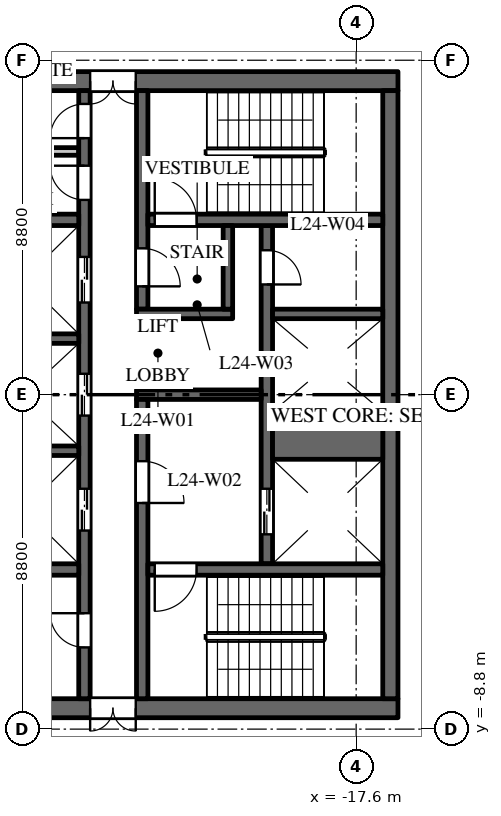
"""IFC4 building model, lengths in metres.
Left out: names, types, materials, properties, quantities, classifications, styles, units other than length and angle.
Written with IfcOpenShell. Run it as: python <this file> out.ifc"""

import sys

from ifc_helpers import new_model, si_unit, direction, frame, frame_2d, origin, place, context, subcontext, project, spatial, rectangle, extrude, element, fill, save


model = new_model("IFC4")
c1 = context("Model", 3, precision=1e-05, world=origin(), true_north=direction((0.0, 1.0)))
c2 = subcontext(c1, "Body", "Model", "MODEL_VIEW")
j1 = project(units=[si_unit("LENGTHUNIT", "METRE"), si_unit("PLANEANGLEUNIT", "RADIAN")], contexts=[c1])
p1 = place(None, origin())
s1 = spatial("IfcSite", under=j1, at=p1, CompositionType="ELEMENT")
p2 = place(p1, origin())
s2 = spatial("IfcBuilding", under=s1, at=p2, CompositionType="ELEMENT")
p3 = place(p2, frame((0.0, 0.0, 108.0)))
s3 = spatial("IfcBuildingStorey", under=s2, at=p3, CompositionType="ELEMENT", Elevation=108.0)
p4 = place(p3, frame((-16.5, 8.25, 0.0), z_axis=(0.0, 0.0, 1.0), x_axis=(-1.0, 0.0, 0.0)))
e1 = element("IfcWall", 1, at=p4, inside=s3, PredefinedType="SHEAR", context=c2, shape_type="SweptSolid", body=[
    extrude(rectangle(XDim=15.0, YDim=0.5, at=frame_2d((7.5, 0.0))), origin(), (0.0, 0.0, 1.0), 3.7),
])
p5 = place(p4, frame((6.9, 0.0, 0.0)))
e2 = element("IfcOpeningElement", 2, at=p5, cuts=e1, PredefinedType="OPENING", context=c2, shape_type="SweptSolid", body=[
    extrude(rectangle(XDim=1.2, YDim=2.1, at=frame_2d((0.6, 1.05))), frame((0.0, 0.26, 0.0), z_axis=(0.0, -1.0, 0.0), x_axis=(1.0, 0.0, 0.0)), (0.0, 0.0, 1.0), 0.52),
])
p6 = place(p4, frame((12.275, 0.0, 0.0)))
e3 = element("IfcOpeningElement", 3, at=p6, cuts=e1, PredefinedType="OPENING", context=c2, shape_type="SweptSolid", body=[
    extrude(rectangle(XDim=0.9, YDim=2.1, at=frame_2d((0.45, 1.05))), frame((0.0, 0.26, 0.0), z_axis=(0.0, -1.0, 0.0), x_axis=(1.0, 0.0, 0.0)), (0.0, 0.0, 1.0), 0.52),
])
p7 = place(p3, frame((-16.5, -8.25, 0.0), z_axis=(0.0, 0.0, 1.0), x_axis=(-1.0, 0.0, 0.0)))
e4 = element("IfcWall", 4, at=p7, inside=s3, PredefinedType="SHEAR", context=c2, shape_type="SweptSolid", body=[
    extrude(rectangle(XDim=15.0, YDim=0.5, at=frame_2d((7.5, 0.0))), origin(), (0.0, 0.0, 1.0), 3.7),
])
p8 = place(p7, frame((6.9, 0.0, 0.0)))
e5 = element("IfcOpeningElement", 5, at=p8, cuts=e4, PredefinedType="OPENING", context=c2, shape_type="SweptSolid", body=[
    extrude(rectangle(XDim=1.2, YDim=2.1, at=frame_2d((0.6, 1.05))), frame((0.0, 0.26, 0.0), z_axis=(0.0, -1.0, 0.0), x_axis=(1.0, 0.0, 0.0)), (0.0, 0.0, 1.0), 0.52),
])
p9 = place(p7, frame((12.425, 0.0, 0.0)))
e6 = element("IfcOpeningElement", 6, at=p9, cuts=e4, PredefinedType="OPENING", context=c2, shape_type="SweptSolid", body=[
    extrude(rectangle(XDim=0.9, YDim=2.1, at=frame_2d((0.45, 1.05))), frame((0.0, 0.26, 0.0), z_axis=(0.0, -1.0, 0.0), x_axis=(1.0, 0.0, 0.0)), (0.0, 0.0, 1.0), 0.52),
])
p10 = place(p3, frame((-19.95, -4.45, 0.0), z_axis=(0.0, 0.0, 1.0), x_axis=(0.0, 1.0, 0.0)))
e7 = element("IfcWall", 7, at=p10, inside=s3, PredefinedType="SHEAR", context=c2, shape_type="SweptSolid", body=[
    extrude(rectangle(XDim=8.9, YDim=0.3, at=frame_2d((4.45, 0.0))), origin(), (0.0, 0.0, 1.0), 3.7),
])
p11 = place(p10, frame((0.775, 0.0, 0.0)))
e8 = element("IfcOpeningElement", 8, at=p11, cuts=e7, PredefinedType="OPENING", context=c2, shape_type="SweptSolid", body=[
    extrude(rectangle(XDim=1.2, YDim=2.1, at=frame_2d((0.6, 1.05))), frame((0.0, 0.16, 0.0), z_axis=(0.0, -1.0, 0.0), x_axis=(1.0, 0.0, 0.0)), (0.0, 0.0, 1.0), 0.32),
])
p12 = place(p10, frame((7.35, 0.0, 0.0)))
e9 = element("IfcOpeningElement", 9, at=p12, cuts=e7, PredefinedType="OPENING", context=c2, shape_type="SweptSolid", body=[
    extrude(rectangle(XDim=0.9, YDim=2.1, at=frame_2d((0.45, 1.05))), frame((0.0, 0.16, 0.0), z_axis=(0.0, -1.0, 0.0), x_axis=(1.0, 0.0, 0.0)), (0.0, 0.0, 1.0), 0.32),
])
p13 = place(p3, frame((-24.75, -8.0, 0.0), z_axis=(0.0, 0.0, 1.0), x_axis=(0.0, 1.0, 0.0)))
e10 = element("IfcWall", 10, at=p13, inside=s3, PredefinedType="SHEAR", context=c2, shape_type="SweptSolid", body=[
    extrude(rectangle(XDim=16.0, YDim=0.3, at=frame_2d((8.0, 0.0))), origin(), (0.0, 0.0, 1.0), 3.7),
])
p14 = place(p13, frame((4.425, 0.0, 0.0)))
e11 = element("IfcOpeningElement", 11, at=p14, cuts=e10, PredefinedType="OPENING", context=c2, shape_type="SweptSolid", body=[
    extrude(rectangle(XDim=1.1, YDim=2.1, at=frame_2d((0.55, 1.05))), frame((0.0, 0.16, 0.0), z_axis=(0.0, -1.0, 0.0), x_axis=(1.0, 0.0, 0.0)), (0.0, 0.0, 1.0), 0.32),
])
p15 = place(p13, frame((7.45, 0.0, 0.0)))
e12 = element("IfcOpeningElement", 12, at=p15, cuts=e10, PredefinedType="OPENING", context=c2, shape_type="SweptSolid", body=[
    extrude(rectangle(XDim=1.1, YDim=2.1, at=frame_2d((0.55, 1.05))), frame((0.0, 0.16, 0.0), z_axis=(0.0, -1.0, 0.0), x_axis=(1.0, 0.0, 0.0)), (0.0, 0.0, 1.0), 0.32),
])
p16 = place(p13, frame((10.425, 0.0, 0.0)))
e13 = element("IfcOpeningElement", 13, at=p16, cuts=e10, PredefinedType="OPENING", context=c2, shape_type="SweptSolid", body=[
    extrude(rectangle(XDim=1.2, YDim=2.1, at=frame_2d((0.6, 1.05))), frame((0.0, 0.16, 0.0), z_axis=(0.0, -1.0, 0.0), x_axis=(1.0, 0.0, 0.0)), (0.0, 0.0, 1.0), 0.32),
])
p17 = place(p13, frame((13.125, 0.0, 0.0)))
e14 = element("IfcOpeningElement", 14, at=p17, cuts=e10, PredefinedType="OPENING", context=c2, shape_type="SweptSolid", body=[
    extrude(rectangle(XDim=0.9, YDim=2.1, at=frame_2d((0.45, 1.05))), frame((0.0, 0.16, 0.0), z_axis=(0.0, -1.0, 0.0), x_axis=(1.0, 0.0, 0.0)), (0.0, 0.0, 1.0), 0.32),
])
p18 = place(p13, frame((14.75, 0.0, 0.0)))
e15 = element("IfcOpeningElement", 15, at=p18, cuts=e10, PredefinedType="OPENING", context=c2, shape_type="SweptSolid", body=[
    extrude(rectangle(XDim=0.9, YDim=2.1, at=frame_2d((0.45, 1.05))), frame((0.0, 0.16, 0.0), z_axis=(0.0, -1.0, 0.0), x_axis=(1.0, 0.0, 0.0)), (0.0, 0.0, 1.0), 0.32),
])
p19 = place(p13, frame((1.35, 0.0, 0.0)))
e16 = element("IfcOpeningElement", 16, at=p19, cuts=e10, PredefinedType="OPENING", context=c2, shape_type="SweptSolid", body=[
    extrude(rectangle(XDim=0.9, YDim=2.1, at=frame_2d((0.45, 1.05))), frame((0.0, 0.16, 0.0), z_axis=(0.0, -1.0, 0.0), x_axis=(1.0, 0.0, 0.0)), (0.0, 0.0, 1.0), 0.32),
])
p20 = place(p3, frame((-20.1, 0.0, 0.0), z_axis=(0.0, 0.0, 1.0), x_axis=(-1.0, 0.0, 0.0)))
e17 = element("IfcWall", 17, at=p20, inside=s3, PredefinedType="SHEAR", context=c2, shape_type="SweptSolid", body=[
    extrude(rectangle(XDim=3.28, YDim=0.25, at=frame_2d((1.64, 0.0))), origin(), (0.0, 0.0, 1.0), 3.7),
])
p21 = place(p3, frame((-16.7, -8.0, 0.0), z_axis=(0.0, 0.0, 1.0), x_axis=(0.0, 1.0, 0.0)))
e18 = element("IfcWall", 18, at=p21, inside=s3, PredefinedType="SHEAR", context=c2, shape_type="SweptSolid", body=[
    extrude(rectangle(XDim=16.0, YDim=0.4, at=frame_2d((8.0, 0.0))), origin(), (0.0, 0.0, 1.0), 3.7),
])
p22 = place(p3, frame((-24.9, 4.6, 0.0), z_axis=(0.0, 0.0, 1.0), x_axis=(-1.0, 0.0, 0.0)))
e19 = element("IfcWall", 19, at=p22, inside=s3, PredefinedType="SHEAR", context=c2, shape_type="SweptSolid", body=[
    extrude(rectangle(XDim=6.1, YDim=0.3, at=frame_2d((3.05, 0.0))), origin(), (0.0, 0.0, 1.0), 3.7),
])
p23 = place(p22, frame((4.2, 0.0, 0.0)))
e20 = element("IfcOpeningElement", 20, at=p23, cuts=e19, PredefinedType="OPENING", context=c2, shape_type="SweptSolid", body=[
    extrude(rectangle(XDim=0.9, YDim=2.1, at=frame_2d((0.45, 1.05))), frame((0.0, 0.16, 0.0), z_axis=(0.0, -1.0, 0.0), x_axis=(1.0, 0.0, 0.0)), (0.0, 0.0, 1.0), 0.32),
])
p24 = place(p3, frame((-24.9, 6.4, 0.0), z_axis=(0.0, 0.0, 1.0), x_axis=(-1.0, 0.0, 0.0)))
e21 = element("IfcWall", 21, at=p24, inside=s3, PredefinedType="PARTITIONING", context=c2, shape_type="SweptSolid", body=[
    extrude(rectangle(XDim=2.35, YDim=0.2, at=frame_2d((1.175, 0.0))), origin(), (0.0, 0.0, 1.0), 3.7),
])
p25 = place(p3, frame((-24.9, -4.6, 0.0), z_axis=(0.0, 0.0, 1.0), x_axis=(-1.0, 0.0, 0.0)))
e22 = element("IfcWall", 22, at=p25, inside=s3, PredefinedType="SHEAR", context=c2, shape_type="SweptSolid", body=[
    extrude(rectangle(XDim=6.1, YDim=0.3, at=frame_2d((3.05, 0.0))), origin(), (0.0, 0.0, 1.0), 3.7),
])
p26 = place(p3, frame((-16.9, -1.075, 0.0), z_axis=(0.0, 0.0, 1.0), x_axis=(-1.0, 0.0, 0.0)))
e23 = element("IfcWall", 23, at=p26, inside=s3, PredefinedType="SHEAR", context=c2, shape_type="SweptSolid", body=[
    extrude(rectangle(XDim=2.9, YDim=1.25, at=frame_2d((1.45, 0.0))), origin(), (0.0, 0.0, 1.0), 3.7),
])
for number, where, z_axis, x_axis in (
    (24, (-16.9, 2.125, 0.0), (0.0, 0.0, 1.0), (-1.0, 0.0, 0.0)),
    (25, (-24.9, -1.475, 0.0), (0.0, 0.0, 1.0), (-1.0, 0.0, 0.0)),
    (26, (-24.9, 1.475, 0.0), (0.0, 0.0, 1.0), (-1.0, 0.0, 0.0)),
):
    element("IfcWall", number, at=place(p3, frame(where, z_axis=z_axis, x_axis=x_axis)), inside=s3, PredefinedType="SHEAR", context=c2, shape_type="SweptSolid", body=[
        extrude(rectangle(XDim=2.9, YDim=0.25, at=frame_2d((1.45, 0.0))), origin(), (0.0, 0.0, 1.0), 3.7),
    ])
p27 = place(p3, frame((-23.23, 2.25, 0.0), z_axis=(0.0, 0.0, 1.0), x_axis=(0.0, 1.0, 0.0)))
e27 = element("IfcWall", 27, at=p27, inside=s3, PredefinedType="SHEAR", context=c2, shape_type="SweptSolid", body=[
    extrude(rectangle(XDim=5.75, YDim=0.3, at=frame_2d((2.875, 0.0))), origin(), (0.0, 0.0, 1.0), 3.7),
])
p28 = place(p27, frame((0.6, 0.0, 0.0)))
e28 = element("IfcOpeningElement", 28, at=p28, cuts=e27, PredefinedType="OPENING", context=c2, shape_type="SweptSolid", body=[
    extrude(rectangle(XDim=1.0, YDim=2.1, at=frame_2d((0.5, 1.05))), frame((0.0, 0.16, 0.0), z_axis=(0.0, -1.0, 0.0), x_axis=(1.0, 0.0, 0.0)), (0.0, 0.0, 1.0), 0.32),
])
p29 = place(p3, frame((-23.23, -8.0, 0.0), z_axis=(0.0, 0.0, 1.0), x_axis=(0.0, 1.0, 0.0)))
e29 = element("IfcWall", 29, at=p29, inside=s3, PredefinedType="SHEAR", context=c2, shape_type="SweptSolid", body=[
    extrude(rectangle(XDim=7.875, YDim=0.3, at=frame_2d((3.938, 0.0))), origin(), (0.0, 0.0, 1.0), 3.7),
])
p30 = place(p29, frame((5.15, 0.0, 0.0)))
e30 = element("IfcOpeningElement", 30, at=p30, cuts=e29, PredefinedType="OPENING", context=c2, shape_type="SweptSolid", body=[
    extrude(rectangle(XDim=1.1, YDim=2.1, at=frame_2d((0.55, 1.05))), frame((0.0, 0.16, 0.0), z_axis=(0.0, -1.0, 0.0), x_axis=(1.0, 0.0, 0.0)), (0.0, 0.0, 1.0), 0.32),
])
p31 = place(p3, frame((-16.9, 4.6, 0.0), z_axis=(0.0, 0.0, 1.0), x_axis=(-1.0, 0.0, 0.0)))
e31 = element("IfcWall", 31, at=p31, inside=s3, PredefinedType="SHEAR", context=c2, shape_type="SweptSolid", body=[
    extrude(rectangle(XDim=6.18, YDim=0.3, at=frame_2d((3.09, 0.0))), origin(), (0.0, 0.0, 1.0), 3.7),
])
p32 = place(p31, frame((4.9, 0.0, 0.0)))
e32 = element("IfcOpeningElement", 32, at=p32, cuts=e31, PredefinedType="OPENING", context=c2, shape_type="SweptSolid", body=[
    extrude(rectangle(XDim=1.1, YDim=2.1, at=frame_2d((0.55, 1.05))), frame((0.0, 0.16, 0.0), z_axis=(0.0, -1.0, 0.0), x_axis=(1.0, 0.0, 0.0)), (0.0, 0.0, 1.0), 0.32),
])
p33 = place(p3, frame((-16.9, -4.6, 0.0), z_axis=(0.0, 0.0, 1.0), x_axis=(-1.0, 0.0, 0.0)))
e33 = element("IfcWall", 33, at=p33, inside=s3, PredefinedType="SHEAR", context=c2, shape_type="SweptSolid", body=[
    extrude(rectangle(XDim=6.18, YDim=0.3, at=frame_2d((3.09, 0.0))), origin(), (0.0, 0.0, 1.0), 3.7),
])
p34 = place(p33, frame((4.9, 0.0, 0.0)))
e34 = element("IfcOpeningElement", 34, at=p34, cuts=e33, PredefinedType="OPENING", context=c2, shape_type="SweptSolid", body=[
    extrude(rectangle(XDim=1.1, YDim=2.1, at=frame_2d((0.55, 1.05))), frame((0.0, 0.16, 0.0), z_axis=(0.0, -1.0, 0.0), x_axis=(1.0, 0.0, 0.0)), (0.0, 0.0, 1.0), 0.32),
])
p35 = place(p3, frame((-20.85, 2.125, 0.0), z_axis=(0.0, 0.0, 1.0), x_axis=(-1.0, 0.0, 0.0)))
e35 = element("IfcWall", 35, at=p35, inside=s3, PredefinedType="SHEAR", context=c2, shape_type="SweptSolid", body=[
    extrude(rectangle(XDim=2.53, YDim=0.25, at=frame_2d((1.265, 0.0))), origin(), (0.0, 0.0, 1.0), 3.7),
])
p36 = place(p3, frame((-20.975, 2.25, 0.0), z_axis=(0.0, 0.0, 1.0), x_axis=(0.0, 1.0, 0.0)))
e36 = element("IfcWall", 36, at=p36, inside=s3, PredefinedType="SHEAR", context=c2, shape_type="SweptSolid", body=[
    extrude(rectangle(XDim=2.2, YDim=0.25, at=frame_2d((1.1, 0.0))), origin(), (0.0, 0.0, 1.0), 3.7),
])
p37 = place(p11, origin())
e37 = element("IfcDoor", 37, at=p37, inside=s3, OperationType="DOUBLE_DOOR_SLIDING", PredefinedType="DOOR", context=c2, shape_type="SweptSolid", body=[
    extrude(rectangle(XDim=1.2, YDim=2.1, at=frame_2d((0.6, 1.05))), frame((0.0, 0.025, 0.0), z_axis=(0.0, -1.0, 0.0), x_axis=(1.0, 0.0, 0.0)), (0.0, 0.0, 1.0), 0.05),
])
fill(e8, e37)
p38 = place(p14, origin())
e38 = element("IfcDoor", 38, at=p38, inside=s3, OperationType="DOUBLE_DOOR_SLIDING", PredefinedType="DOOR", context=c2, shape_type="SweptSolid", body=[
    extrude(rectangle(XDim=1.1, YDim=2.1, at=frame_2d((0.55, 1.05))), frame((0.0, 0.025, 0.0), z_axis=(0.0, -1.0, 0.0), x_axis=(1.0, 0.0, 0.0)), (0.0, 0.0, 1.0), 0.05),
])
fill(e11, e38)
p39 = place(p15, origin())
e39 = element("IfcDoor", 39, at=p39, inside=s3, OperationType="DOUBLE_DOOR_SLIDING", PredefinedType="DOOR", context=c2, shape_type="SweptSolid", body=[
    extrude(rectangle(XDim=1.1, YDim=2.1, at=frame_2d((0.55, 1.05))), frame((0.0, 0.025, 0.0), z_axis=(0.0, -1.0, 0.0), x_axis=(1.0, 0.0, 0.0)), (0.0, 0.0, 1.0), 0.05),
])
fill(e12, e39)
p40 = place(p16, origin())
e40 = element("IfcDoor", 40, at=p40, inside=s3, OperationType="DOUBLE_DOOR_SLIDING", PredefinedType="DOOR", context=c2, shape_type="SweptSolid", body=[
    extrude(rectangle(XDim=1.2, YDim=2.1, at=frame_2d((0.6, 1.05))), frame((0.0, 0.025, 0.0), z_axis=(0.0, -1.0, 0.0), x_axis=(1.0, 0.0, 0.0)), (0.0, 0.0, 1.0), 0.05),
])
fill(e13, e40)
p41 = place(p32, origin())
e41 = element("IfcDoor", 41, at=p41, inside=s3, OperationType="SINGLE_SWING_RIGHT", PredefinedType="DOOR", context=c2, shape_type="SweptSolid", body=[
    extrude(rectangle(XDim=1.1, YDim=2.1, at=frame_2d((0.55, 1.05))), frame((0.0, 0.025, 0.0), z_axis=(0.0, -1.0, 0.0), x_axis=(1.0, 0.0, 0.0)), (0.0, 0.0, 1.0), 0.05),
])
fill(e32, e41)
p42 = place(p34, origin())
e42 = element("IfcDoor", 42, at=p42, inside=s3, OperationType="SINGLE_SWING_LEFT", PredefinedType="DOOR", context=c2, shape_type="SweptSolid", body=[
    extrude(rectangle(XDim=1.1, YDim=2.1, at=frame_2d((0.55, 1.05))), frame((0.0, 0.025, 0.0), z_axis=(0.0, -1.0, 0.0), x_axis=(1.0, 0.0, 0.0)), (0.0, 0.0, 1.0), 0.05),
])
fill(e34, e42)
p43 = place(p30, origin())
e43 = element("IfcDoor", 43, at=p43, inside=s3, OperationType="SINGLE_SWING_LEFT", PredefinedType="DOOR", context=c2, shape_type="SweptSolid", body=[
    extrude(rectangle(XDim=1.1, YDim=2.1, at=frame_2d((0.55, 1.05))), frame((0.0, 0.025, 0.0), z_axis=(0.0, -1.0, 0.0), x_axis=(1.0, 0.0, 0.0)), (0.0, 0.0, 1.0), 0.05),
])
fill(e30, e43)
p44 = place(p28, origin())
e44 = element("IfcDoor", 44, at=p44, inside=s3, OperationType="SINGLE_SWING_LEFT", PredefinedType="DOOR", context=c2, shape_type="SweptSolid", body=[
    extrude(rectangle(XDim=1.0, YDim=2.1, at=frame_2d((0.5, 1.05))), frame((0.0, 0.025, 0.0), z_axis=(0.0, -1.0, 0.0), x_axis=(1.0, 0.0, 0.0)), (0.0, 0.0, 1.0), 0.05),
])
fill(e28, e44)
p45 = place(p5, origin())
e45 = element("IfcDoor", 45, at=p45, inside=s3, OperationType="DOUBLE_DOOR_DOUBLE_SWING", PredefinedType="DOOR", context=c2, shape_type="SweptSolid", body=[
    extrude(rectangle(XDim=1.2, YDim=2.1, at=frame_2d((0.6, 1.05))), frame((0.0, 0.025, 0.0), z_axis=(0.0, -1.0, 0.0), x_axis=(1.0, 0.0, 0.0)), (0.0, 0.0, 1.0), 0.05),
])
fill(e2, e45)
p46 = place(p8, origin())
e46 = element("IfcDoor", 46, at=p46, inside=s3, OperationType="DOUBLE_DOOR_DOUBLE_SWING", PredefinedType="DOOR", context=c2, shape_type="SweptSolid", body=[
    extrude(rectangle(XDim=1.2, YDim=2.1, at=frame_2d((0.6, 1.05))), frame((0.0, 0.025, 0.0), z_axis=(0.0, -1.0, 0.0), x_axis=(1.0, 0.0, 0.0)), (0.0, 0.0, 1.0), 0.05),
])
fill(e5, e46)
p47 = place(p12, origin())
e47 = element("IfcDoor", 47, at=p47, inside=s3, OperationType="SINGLE_SWING_LEFT", PredefinedType="DOOR", context=c2, shape_type="SweptSolid", body=[
    extrude(rectangle(XDim=0.9, YDim=2.1, at=frame_2d((0.45, 1.05))), frame((0.0, 0.025, 0.0), z_axis=(0.0, -1.0, 0.0), x_axis=(1.0, 0.0, 0.0)), (0.0, 0.0, 1.0), 0.05),
])
fill(e9, e47)
p48 = place(p17, origin())
e48 = element("IfcDoor", 48, at=p48, inside=s3, OperationType="SINGLE_SWING_LEFT", PredefinedType="DOOR", context=c2, shape_type="SweptSolid", body=[
    extrude(rectangle(XDim=0.9, YDim=2.1, at=frame_2d((0.45, 1.05))), frame((0.0, 0.025, 0.0), z_axis=(0.0, -1.0, 0.0), x_axis=(1.0, 0.0, 0.0)), (0.0, 0.0, 1.0), 0.05),
])
fill(e14, e48)
p49 = place(p18, origin())
e49 = element("IfcDoor", 49, at=p49, inside=s3, OperationType="SINGLE_SWING_RIGHT", PredefinedType="DOOR", context=c2, shape_type="SweptSolid", body=[
    extrude(rectangle(XDim=0.9, YDim=2.1, at=frame_2d((0.45, 1.05))), frame((0.0, 0.025, 0.0), z_axis=(0.0, -1.0, 0.0), x_axis=(1.0, 0.0, 0.0)), (0.0, 0.0, 1.0), 0.05),
])
fill(e15, e49)
p50 = place(p19, origin())
e50 = element("IfcDoor", 50, at=p50, inside=s3, OperationType="SINGLE_SWING_LEFT", PredefinedType="DOOR", context=c2, shape_type="SweptSolid", body=[
    extrude(rectangle(XDim=0.9, YDim=2.1, at=frame_2d((0.45, 1.05))), frame((0.0, 0.025, 0.0), z_axis=(0.0, -1.0, 0.0), x_axis=(1.0, 0.0, 0.0)), (0.0, 0.0, 1.0), 0.05),
])
fill(e16, e50)
save(model, sys.argv[1])
